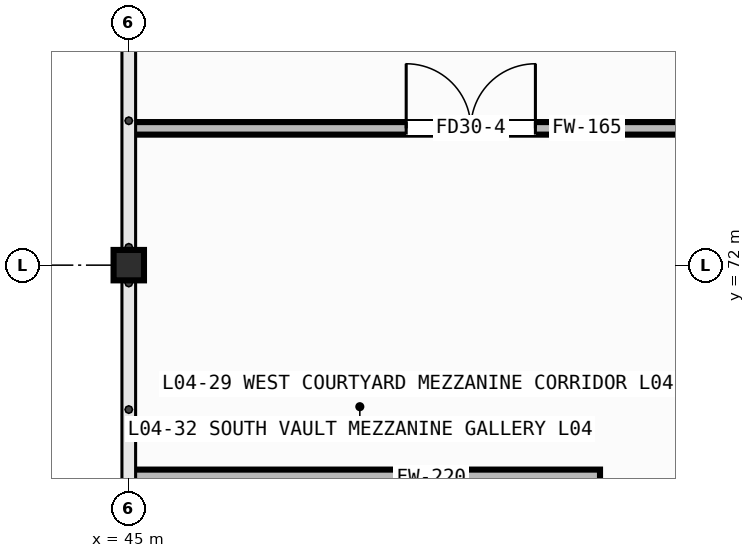
"""IFC4 building model, lengths in metres.
Left out: names, types, materials, properties, quantities, classifications, styles, units other than length and angle.
Written with IfcOpenShell. Run it as: python <this file> out.ifc"""

import sys

from ifc_helpers import new_model, si_unit, direction, frame, frame_2d, origin, origin_2d, place, context, subcontext, project, spatial, rectangle, hollow_rectangle, extrude, element, fill, save


model = new_model("IFC4")
c1 = context("Model", 3, precision=1e-05, world=origin(), true_north=direction((0.0, 1.0)))
c2 = subcontext(c1, "Body", "Model", "MODEL_VIEW")
j1 = project(units=[si_unit("LENGTHUNIT", "METRE"), si_unit("PLANEANGLEUNIT", "RADIAN")], contexts=[c1])
p1 = place(None, origin())
s1 = spatial("IfcSite", under=j1, at=p1, CompositionType="ELEMENT")
p2 = place(p1, origin())
s2 = spatial("IfcBuilding", under=s1, at=p2, CompositionType="ELEMENT")
p3 = place(p2, frame((0.0, 0.0, 12.8)))
s3 = spatial("IfcBuildingStorey", under=s2, at=p3, CompositionType="ELEMENT", Elevation=12.8)
p4 = place(p3, frame((45.0, 72.0, 0.0), z_axis=(0.0, 0.0, 1.0), x_axis=(1.0, 0.0, 0.0)))
e1 = element("IfcColumn", 1, at=p4, inside=s3, PredefinedType="COLUMN", context=c2, shape_type="SweptSolid", body=[
    extrude(hollow_rectangle(XDim=0.4, YDim=0.4, WallThickness=0.016, at=origin_2d()), origin(), (0.0, 0.0, 1.0), 3.78),
])
p5 = place(p3, frame((45.035, 69.2, 0.0), z_axis=(0.0, 0.0, 1.0), x_axis=(1.0, 0.0, 0.0)))
e2 = element("IfcWall", 2, at=p5, inside=s3, PredefinedType="PARTITIONING", context=c2, shape_type="SweptSolid", body=[
    extrude(rectangle(XDim=6.165, YDim=0.22, at=frame_2d((3.083, 0.0))), origin(), (0.0, 0.0, 1.0), 3.78),
])
p6 = place(p3, frame((45.035, 73.8, 0.0), z_axis=(0.0, 0.0, 1.0), x_axis=(1.0, 0.0, 0.0)))
e3 = element("IfcWall", 3, at=p6, inside=s3, PredefinedType="PARTITIONING", context=c2, shape_type="SweptSolid", body=[
    extrude(rectangle(XDim=9.365, YDim=0.165, at=frame_2d((4.683, 0.0))), origin(), (0.0, 0.0, 1.0), 3.78),
])
p7 = place(p6, frame((3.615, 0.0, 0.0)))
e4 = element("IfcOpeningElement", 4, at=p7, cuts=e3, PredefinedType="OPENING", context=c2, shape_type="SweptSolid", body=[
    extrude(rectangle(XDim=1.7, YDim=2.12, at=frame_2d((0.85, 1.06))), frame((0.0, 0.094, 0.0), z_axis=(0.0, -1.0, 0.0), x_axis=(1.0, 0.0, 0.0)), (0.0, 0.0, 1.0), 0.189),
])
p8 = place(p7, origin())
e5 = element("IfcDoor", 5, at=p8, inside=s3, OperationType="DOUBLE_DOOR_SINGLE_SWING", PredefinedType="DOOR", context=c2, shape_type="SweptSolid", body=[
    extrude(rectangle(XDim=1.7, YDim=2.12, at=frame_2d((0.85, 1.06))), frame((0.0, 0.025, 0.0), z_axis=(0.0, -1.0, 0.0), x_axis=(1.0, 0.0, 0.0)), (0.0, 0.0, 1.0), 0.05),
])
fill(e4, e5)
save(model, sys.argv[1])
